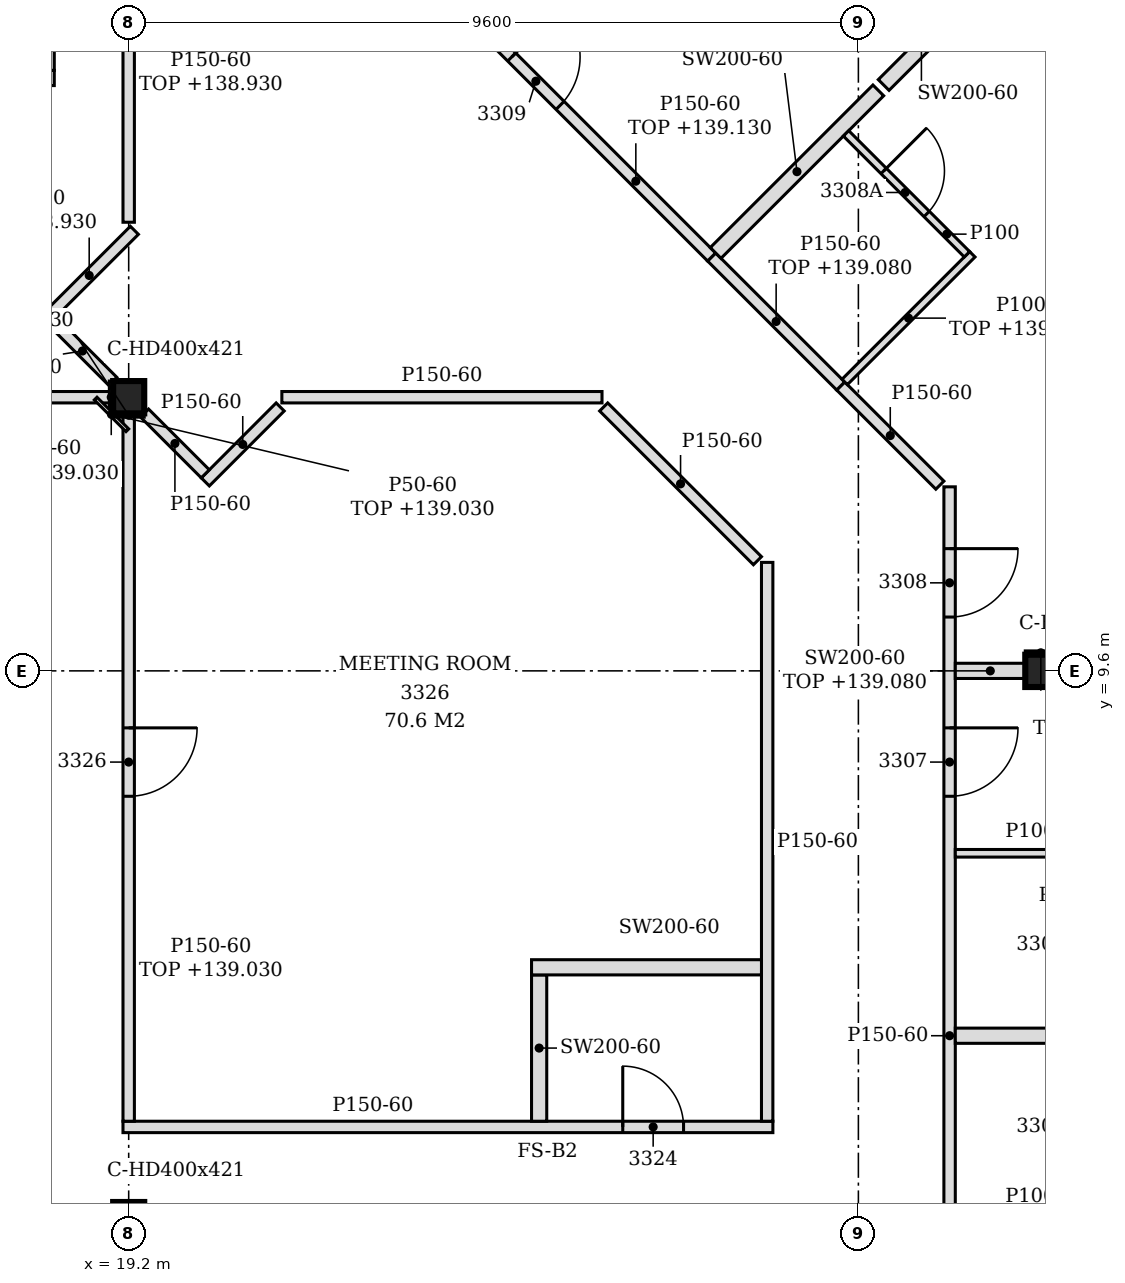
"""IFC4 building model, lengths in metres.
Left out: names, types, materials, properties, quantities, classifications, styles, units other than length and angle.
Written with IfcOpenShell. Run it as: python <this file> out.ifc"""

import sys

from ifc_helpers import new_model, si_unit, direction, frame, frame_2d, origin, origin_2d, place, context, subcontext, project, spatial, polyline, rectangle, i_section, outline, extrude, element, fill, save


model = new_model("IFC4")
c1 = context("Model", 3, precision=1e-05, world=origin(), true_north=direction((0.0, 1.0)))
c2 = subcontext(c1, "Body", "Model", "MODEL_VIEW")
j1 = project(units=[si_unit("LENGTHUNIT", "METRE"), si_unit("PLANEANGLEUNIT", "RADIAN")], contexts=[c1])
p1 = place(None, origin())
s1 = spatial("IfcSite", under=j1, at=p1, CompositionType="ELEMENT")
p2 = place(p1, origin())
s2 = spatial("IfcBuilding", under=s1, at=p2, CompositionType="ELEMENT")
p3 = place(p2, frame((0.0, 0.0, 136.2)))
s3 = spatial("IfcBuildingStorey", under=s2, at=p3, CompositionType="ELEMENT", Elevation=136.2)
for number, where, z_axis, x_axis in (
    (1, (19.2, 2.4, -0.15), (0.0, 0.0, 1.0), (1.0, 0.0, 0.0)),
    (2, (19.2, 13.2, -0.15), (0.0, 0.0, 1.0), (1.0, 0.0, 0.0)),
    (3, (31.2, 9.6, -0.15), (0.0, 0.0, 1.0), (1.0, 0.0, 0.0)),
):
    element("IfcColumn", number, at=place(p3, frame(where, z_axis=z_axis, x_axis=x_axis)), inside=s3, PredefinedType="COLUMN", context=c2, shape_type="SweptSolid", body=[
        extrude(i_section(OverallWidth=0.409, OverallDepth=0.425, WebThickness=0.033, FlangeThickness=0.052, FilletRadius=0.015, at=origin_2d()), origin(), (0.0, 0.0, 1.0), 3.6),
    ])
p4 = place(p3, frame((30.0, -0.813, 0.0), z_axis=(0.0, 0.0, 1.0), x_axis=(0.0, 1.0, 0.0)))
e4 = element("IfcWall", 4, at=p4, inside=s3, PredefinedType="PARTITIONING", context=c2, shape_type="SweptSolid", body=[
    extrude(outline(polyline([(0.0, 0.0), (12.834, 0.0), (12.834, 3.45), (10.518, 3.45), (10.516, 2.88), (10.308, 2.88), (10.306, 3.45), (5.718, 3.45), (5.716, 2.88), (5.508, 2.88), (5.506, 3.45), (0.918, 3.45), (0.916, 2.88), (0.708, 2.88), (0.706, 3.45), (0.0, 3.45), (0.0, 0.0)])), frame((0.0, 0.075, 0.0), z_axis=(0.0, -1.0, 0.0), x_axis=(1.0, 0.0, 0.0)), (0.0, 0.0, 1.0), 0.15),
])
p5 = place(p4, frame((1.563, 0.0, 0.0)))
e5 = element("IfcOpeningElement", 5, at=p5, cuts=e4, PredefinedType="OPENING", context=c2, shape_type="SweptSolid", body=[
    extrude(rectangle(XDim=0.9, YDim=2.1, at=frame_2d((0.45, 1.05))), frame((0.0, 0.085, 0.0), z_axis=(0.0, -1.0, 0.0), x_axis=(1.0, 0.0, 0.0)), (0.0, 0.0, 1.0), 0.17),
])
p6 = place(p4, frame((8.763, 0.0, 0.0)))
e6 = element("IfcOpeningElement", 6, at=p6, cuts=e4, PredefinedType="OPENING", context=c2, shape_type="SweptSolid", body=[
    extrude(rectangle(XDim=0.9, YDim=2.1, at=frame_2d((0.45, 1.05))), frame((0.0, 0.085, 0.0), z_axis=(0.0, -1.0, 0.0), x_axis=(1.0, 0.0, 0.0)), (0.0, 0.0, 1.0), 0.17),
])
p7 = place(p4, frame((11.121, 0.0, 0.0)))
e7 = element("IfcOpeningElement", 7, at=p7, cuts=e4, PredefinedType="OPENING", context=c2, shape_type="SweptSolid", body=[
    extrude(rectangle(XDim=0.9, YDim=2.1, at=frame_2d((0.45, 1.05))), frame((0.0, 0.085, 0.0), z_axis=(0.0, -1.0, 0.0), x_axis=(1.0, 0.0, 0.0)), (0.0, 0.0, 1.0), 0.17),
])
p8 = place(p3, frame((19.125, 3.6, 0.0), z_axis=(0.0, 0.0, 1.0), x_axis=(1.0, 0.0, 0.0)))
e8 = element("IfcWall", 8, at=p8, inside=s3, PredefinedType="PARTITIONING", context=c2, shape_type="SweptSolid", body=[
    extrude(outline(polyline([(0.0, 0.0), (8.55, 0.0), (8.55, 3.45), (0.225, 3.45), (0.223, 2.83), (0.0, 2.83), (0.0, 0.0)])), frame((0.0, 0.075, 0.0), z_axis=(0.0, -1.0, 0.0), x_axis=(1.0, 0.0, 0.0)), (0.0, 0.0, 1.0), 0.15),
])
p9 = place(p8, frame((6.575, 0.0, 0.0)))
e9 = element("IfcOpeningElement", 9, at=p9, cuts=e8, PredefinedType="OPENING", context=c2, shape_type="SweptSolid", body=[
    extrude(rectangle(XDim=0.8, YDim=2.1, at=frame_2d((0.4, 1.05))), frame((0.0, 0.085, 0.0), z_axis=(0.0, -1.0, 0.0), x_axis=(1.0, 0.0, 0.0)), (0.0, 0.0, 1.0), 0.17),
])
p10 = place(p3, frame((19.2, 3.675, 0.0), z_axis=(0.0, 0.0, 1.0), x_axis=(0.0, 1.0, 0.0)))
e10 = element("IfcWall", 10, at=p10, inside=s3, PredefinedType="PARTITIONING", context=c2, shape_type="SweptSolid", body=[
    extrude(rectangle(XDim=9.312, YDim=0.15, at=frame_2d((4.656, 0.0))), origin(), (0.0, 0.0, 1.0), 2.83),
])
p11 = place(p10, frame((4.275, 0.0, 0.0)))
e11 = element("IfcOpeningElement", 11, at=p11, cuts=e10, PredefinedType="OPENING", context=c2, shape_type="SweptSolid", body=[
    extrude(rectangle(XDim=0.9, YDim=2.1, at=frame_2d((0.45, 1.05))), frame((0.0, 0.085, 0.0), z_axis=(0.0, -1.0, 0.0), x_axis=(1.0, 0.0, 0.0)), (0.0, 0.0, 1.0), 0.17),
])
p12 = place(p3, frame((24.6, 3.675, 0.0), z_axis=(0.0, 0.0, 1.0), x_axis=(0.0, 1.0, 0.0)))
e12 = element("IfcWall", 12, at=p12, inside=s3, PredefinedType="PARTITIONING", context=c2, shape_type="SweptSolid", body=[
    extrude(outline(polyline([(0.0, 0.0), (1.925, 0.0), (1.925, 3.45), (1.23, 3.45), (1.228, 2.88), (1.02, 2.88), (1.018, 3.45), (0.0, 3.45), (0.0, 0.0)])), frame((0.0, 0.1, 0.0), z_axis=(0.0, -1.0, 0.0), x_axis=(1.0, 0.0, 0.0)), (0.0, 0.0, 1.0), 0.2),
])
p13 = place(p3, frame((27.6, 3.675, 0.0), z_axis=(0.0, 0.0, 1.0), x_axis=(0.0, 1.0, 0.0)))
e13 = element("IfcWall", 13, at=p13, inside=s3, PredefinedType="PARTITIONING", context=c2, shape_type="SweptSolid", body=[
    extrude(outline(polyline([(0.0, 0.0), (7.352, 0.0), (7.352, 3.45), (6.03, 3.45), (6.028, 2.88), (5.82, 2.88), (5.818, 3.45), (1.23, 3.45), (1.228, 2.88), (1.02, 2.88), (1.018, 3.45), (0.0, 3.45), (0.0, 0.0)])), frame((0.0, 0.075, 0.0), z_axis=(0.0, -1.0, 0.0), x_axis=(1.0, 0.0, 0.0)), (0.0, 0.0, 1.0), 0.15),
])
p14 = place(p3, frame((30.075, 4.8, 0.0), z_axis=(0.0, 0.0, 1.0), x_axis=(1.0, 0.0, 0.0)))
e14 = element("IfcWall", 14, at=p14, inside=s3, PredefinedType="PARTITIONING", context=c2, shape_type="SweptSolid", body=[
    extrude(rectangle(XDim=4.675, YDim=0.2, at=frame_2d((2.337, 0.0))), origin(), (0.0, 0.0, 1.0), 2.88),
])
p15 = place(p3, frame((24.5, 5.7, 0.0), z_axis=(0.0, 0.0, 1.0), x_axis=(1.0, 0.0, 0.0)))
e15 = element("IfcWall", 15, at=p15, inside=s3, PredefinedType="PARTITIONING", context=c2, shape_type="SweptSolid", body=[
    extrude(rectangle(XDim=3.025, YDim=0.2, at=frame_2d((1.512, 0.0))), origin(), (0.0, 0.0, 1.0), 3.45),
])
p16 = place(p3, frame((30.075, 7.2, 0.0), z_axis=(0.0, 0.0, 1.0), x_axis=(1.0, 0.0, 0.0)))
e16 = element("IfcWall", 16, at=p16, inside=s3, PredefinedType="PARTITIONING", context=c2, shape_type="SweptSolid", body=[
    extrude(outline(polyline([(0.0, 0.0), (1.975, 0.0), (1.975, 3.45), (1.275, 3.45), (1.273, 2.93), (0.975, 2.93), (0.973, 3.45), (0.0, 3.45), (0.0, 0.0)])), frame((0.0, 0.05, 0.0), z_axis=(0.0, -1.0, 0.0), x_axis=(1.0, 0.0, 0.0)), (0.0, 0.0, 1.0), 0.1),
])
p17 = place(p3, frame((30.075, 9.6, 0.0), z_axis=(0.0, 0.0, 1.0), x_axis=(1.0, 0.0, 0.0)))
e17 = element("IfcWall", 17, at=p17, inside=s3, PredefinedType="PARTITIONING", context=c2, shape_type="SweptSolid", body=[
    extrude(rectangle(XDim=0.921, YDim=0.2, at=frame_2d((0.46, 0.0))), origin(), (0.0, 0.0, 1.0), 2.88),
])
p18 = place(p3, frame((27.472, 11.049, 0.0), z_axis=(0.0, 0.0, 1.0), x_axis=(-0.707106781187, 0.707106781187, 0.0)))
e18 = element("IfcWall", 18, at=p18, inside=s3, PredefinedType="PARTITIONING", context=c2, shape_type="SweptSolid", body=[
    extrude(rectangle(XDim=2.861, YDim=0.15, at=frame_2d((1.43, 0.0))), origin(), (0.0, 0.0, 1.0), 3.45),
])
p19 = place(p3, frame((29.872, 12.043, 0.0), z_axis=(0.0, 0.0, 1.0), x_axis=(-0.707172918471, 0.707040637716, 0.0)))
e19 = element("IfcWall", 19, at=p19, inside=s3, PredefinedType="PARTITIONING", context=c2, shape_type="SweptSolid", body=[
    extrude(rectangle(XDim=1.846, YDim=0.15, at=frame_2d((0.923, 0.0))), origin(), (0.0, 0.0, 1.0), 3.45),
])
p20 = place(p3, frame((20.208, 12.086, 0.0), z_axis=(0.0, 0.0, 1.0), x_axis=(0.706756381459, 0.707457007363, 0.0)))
e20 = element("IfcWall", 20, at=p20, inside=s3, PredefinedType="PARTITIONING", context=c2, shape_type="SweptSolid", body=[
    extrude(rectangle(XDim=1.394, YDim=0.15, at=frame_2d((0.697, 0.0))), origin(), (0.0, 0.0, 1.0), 3.45),
])
p21 = place(p3, frame((20.208, 12.192, 0.0), z_axis=(0.0, 0.0, 1.0), x_axis=(-0.70721474466, 0.706998801226, 0.0)))
e21 = element("IfcWall", 21, at=p21, inside=s3, PredefinedType="PARTITIONING", context=c2, shape_type="SweptSolid", body=[
    extrude(rectangle(XDim=1.131, YDim=0.15, at=frame_2d((0.565, 0.0))), origin(), (0.0, 0.0, 1.0), 3.45),
])
p22 = place(p3, frame((7.405, 13.2, 0.0), z_axis=(0.0, 0.0, 1.0), x_axis=(1.0, 0.0, 0.0)))
e22 = element("IfcWall", 22, at=p22, inside=s3, PredefinedType="PARTITIONING", context=c2, shape_type="SweptSolid", body=[
    extrude(rectangle(XDim=11.591, YDim=0.15, at=frame_2d((5.795, 0.0))), origin(), (0.0, 0.0, 1.0), 2.83),
])
p23 = place(p22, frame((5.345, 0.0, 0.0)))
e23 = element("IfcOpeningElement", 23, at=p23, cuts=e22, PredefinedType="OPENING", context=c2, shape_type="SweptSolid", body=[
    extrude(rectangle(XDim=0.9, YDim=2.1, at=frame_2d((0.45, 1.05))), frame((0.0, 0.085, 0.0), z_axis=(0.0, -1.0, 0.0), x_axis=(1.0, 0.0, 0.0)), (0.0, 0.0, 1.0), 0.17),
])
p24 = place(p3, frame((21.215, 13.2, 0.0), z_axis=(0.0, 0.0, 1.0), x_axis=(1.0, 0.0, 0.0)))
e24 = element("IfcWall", 24, at=p24, inside=s3, PredefinedType="PARTITIONING", context=c2, shape_type="SweptSolid", body=[
    extrude(rectangle(XDim=4.212, YDim=0.15, at=frame_2d((2.106, 0.0))), origin(), (0.0, 0.0, 1.0), 3.45),
])
p25 = place(p3, frame((28.567, 13.348, 0.0), z_axis=(0.0, 0.0, 1.0), x_axis=(-0.707310148094, 0.706903355773, 0.0)))
e25 = element("IfcWall", 25, at=p25, inside=s3, PredefinedType="PARTITIONING", context=c2, shape_type="SweptSolid", body=[
    extrude(rectangle(XDim=2.401, YDim=0.15, at=frame_2d((1.2, 0.0))), origin(), (0.0, 0.0, 1.0), 2.88),
])
p26 = place(p3, frame((18.991, 13.408, 0.0), z_axis=(0.0, 0.0, 1.0), x_axis=(-0.706998801226, 0.70721474466, 0.0)))
e26 = element("IfcWall", 26, at=p26, inside=s3, PredefinedType="PARTITIONING", context=c2, shape_type="SweptSolid", body=[
    extrude(rectangle(XDim=1.131, YDim=0.15, at=frame_2d((0.565, 0.0))), origin(), (0.0, 0.0, 1.0), 3.45),
])
p27 = place(p3, frame((28.62, 13.401, 0.0), z_axis=(0.0, 0.0, 1.0), x_axis=(0.707055379538, 0.707158179099, 0.0)))
e27 = element("IfcWall", 27, at=p27, inside=s3, PredefinedType="PARTITIONING", context=c2, shape_type="SweptSolid", body=[
    extrude(rectangle(XDim=2.375, YDim=0.1, at=frame_2d((1.188, 0.0))), origin(), (0.0, 0.0, 1.0), 2.88),
])
p28 = place(p3, frame((18.086, 14.208, 0.0), z_axis=(0.0, 0.0, 1.0), x_axis=(0.70739723372, 0.706816209298, 0.0)))
e28 = element("IfcWall", 28, at=p28, inside=s3, PredefinedType="PARTITIONING", context=c2, shape_type="SweptSolid", body=[
    extrude(rectangle(XDim=1.681, YDim=0.15, at=frame_2d((0.84, 0.0))), origin(), (0.0, 0.0, 1.0), 2.73),
])
p29 = place(p3, frame((26.869, 15.045, 0.0), z_axis=(0.0, 0.0, 1.0), x_axis=(-0.707013447311, 0.707200102744, 0.0)))
e29 = element("IfcWall", 29, at=p29, inside=s3, PredefinedType="PARTITIONING", context=c2, shape_type="SweptSolid", body=[
    extrude(rectangle(XDim=6.54, YDim=0.15, at=frame_2d((3.27, 0.0))), origin(), (0.0, 0.0, 1.0), 2.93),
])
p30 = place(p29, frame((2.82, 0.0, 0.0)))
e30 = element("IfcOpeningElement", 30, at=p30, cuts=e29, PredefinedType="OPENING", context=c2, shape_type="SweptSolid", body=[
    extrude(rectangle(XDim=0.9, YDim=2.1, at=frame_2d((0.45, 1.05))), frame((0.0, 0.085, 0.0), z_axis=(0.0, -1.0, 0.0), x_axis=(1.0, 0.0, 0.0)), (0.0, 0.0, 1.0), 0.17),
])
p31 = place(p3, frame((26.922, 15.098, 0.0), z_axis=(0.0, 0.0, 1.0), x_axis=(0.707268147401, 0.706945378138, 0.0)))
e31 = element("IfcWall", 31, at=p31, inside=s3, PredefinedType="PARTITIONING", context=c2, shape_type="SweptSolid", body=[
    extrude(rectangle(XDim=3.026, YDim=0.2, at=frame_2d((1.513, 0.0))), origin(), (0.0, 0.0, 1.0), 3.45),
])
p32 = place(p3, frame((30.229, 15.08, 0.0), z_axis=(0.0, 0.0, 1.0), x_axis=(-0.707052524, 0.70716103421, 0.0)))
e32 = element("IfcWall", 32, at=p32, inside=s3, PredefinedType="PARTITIONING", context=c2, shape_type="SweptSolid", body=[
    extrude(rectangle(XDim=2.25, YDim=0.1, at=frame_2d((1.125, 0.0))), origin(), (0.0, 0.0, 1.0), 3.45),
])
p33 = place(p32, frame((0.75, 0.0, 0.0)))
e33 = element("IfcOpeningElement", 33, at=p33, cuts=e32, PredefinedType="OPENING", context=c2, shape_type="SweptSolid", body=[
    extrude(rectangle(XDim=0.8, YDim=2.1, at=frame_2d((0.4, 1.05))), frame((0.0, 0.06, 0.0), z_axis=(0.0, -1.0, 0.0), x_axis=(1.0, 0.0, 0.0)), (0.0, 0.0, 1.0), 0.12),
])
p34 = place(p3, frame((19.2, 15.502, 0.0), z_axis=(0.0, 0.0, 1.0), x_axis=(0.0, 1.0, 0.0)))
e34 = element("IfcWall", 34, at=p34, inside=s3, PredefinedType="PARTITIONING", context=c2, shape_type="SweptSolid", body=[
    extrude(rectangle(XDim=3.925, YDim=0.15, at=frame_2d((1.962, 0.0))), origin(), (0.0, 0.0, 1.0), 2.73),
])
p35 = place(p3, frame((29.133, 17.308, 0.0), z_axis=(0.0, 0.0, 1.0), x_axis=(0.70693298083, 0.707280538835, 0.0)))
e35 = element("IfcWall", 35, at=p35, inside=s3, PredefinedType="PARTITIONING", context=c2, shape_type="SweptSolid", body=[
    extrude(rectangle(XDim=1.405, YDim=0.2, at=frame_2d((0.702, 0.0))), origin(), (0.0, 0.0, 1.0), 3.45),
])
p36 = place(p3, frame((15.021, 17.4, 0.0), z_axis=(0.0, 0.0, 1.0), x_axis=(1.0, 0.0, 0.0)))
e36 = element("IfcWall", 36, at=p36, inside=s3, PredefinedType="PARTITIONING", context=c2, shape_type="SweptSolid", body=[
    extrude(rectangle(XDim=3.2, YDim=0.2, at=frame_2d((1.6, 0.0))), origin(), (0.0, 0.0, 1.0), 3.45),
])
p37 = place(p3, frame((18.121, 17.5, 0.0), z_axis=(0.0, 0.0, 1.0), x_axis=(0.0, 1.0, 0.0)))
e37 = element("IfcWall", 37, at=p37, inside=s3, PredefinedType="PARTITIONING", context=c2, shape_type="SweptSolid", body=[
    extrude(outline(polyline([(0.0, 0.0), (3.016, 0.0), (3.016, 3.45), (1.805, 3.45), (1.803, 2.88), (1.595, 2.88), (1.593, 3.45), (0.0, 3.45), (0.0, 0.0)])), frame((0.0, 0.1, 0.0), z_axis=(0.0, -1.0, 0.0), x_axis=(1.0, 0.0, 0.0)), (0.0, 0.0, 1.0), 0.2),
])
p38 = place(p3, frame((18.97, 12.988, 0.0), z_axis=(0.0, 0.0, 1.0), x_axis=(0.0, 1.0, 0.0)))
e38 = element("IfcWall", 38, at=p38, inside=s3, PredefinedType="PARTITIONING", context=c2, shape_type="SweptSolid", body=[
    extrude(rectangle(XDim=0.425, YDim=0.05, at=frame_2d((0.212, 0.0))), origin(), (0.0, 0.0, 1.0), 2.83),
])
p39 = place(p3, frame((30.996, 9.837, 0.0), z_axis=(0.0, 0.0, 1.0), x_axis=(1.0, 0.0, 0.0)))
e39 = element("IfcWall", 39, at=p39, inside=s3, PredefinedType="PARTITIONING", context=c2, shape_type="SweptSolid", body=[
    extrude(rectangle(XDim=0.409, YDim=0.05, at=frame_2d((0.205, 0.0))), origin(), (0.0, 0.0, 1.0), 2.93),
])
p40 = place(p3, frame((19.182, 12.765, 0.0), z_axis=(0.0, 0.0, 1.0), x_axis=(-0.707106781187, 0.707106781187, 0.0)))
e40 = element("IfcWall", 40, at=p40, inside=s3, PredefinedType="PARTITIONING", context=c2, shape_type="SweptSolid", body=[
    extrude(rectangle(XDim=0.59, YDim=0.05, at=frame_2d((0.295, 0.0))), origin(), (0.0, 0.0, 1.0), 2.83),
])
p41 = place(p3, frame((18.996, 12.962, 0.0), z_axis=(0.0, 0.0, 1.0), x_axis=(1.0, 0.0, 0.0)))
e41 = element("IfcWall", 41, at=p41, inside=s3, PredefinedType="PARTITIONING", context=c2, shape_type="SweptSolid", body=[
    extrude(rectangle(XDim=0.409, YDim=0.05, at=frame_2d((0.205, 0.0))), origin(), (0.0, 0.0, 1.0), 2.83),
])
p42 = place(p6, frame((0.9, 0.0, 0.0), z_axis=(0.0, 0.0, 1.0), x_axis=(-1.0, 0.0, 0.0)))
e42 = element("IfcDoor", 42, at=p42, inside=s3, OperationType="SINGLE_SWING_LEFT", PredefinedType="DOOR", context=c2, shape_type="SweptSolid", body=[
    extrude(rectangle(XDim=0.9, YDim=2.1, at=frame_2d((0.45, 1.05))), frame((0.0, 0.025, 0.0), z_axis=(0.0, -1.0, 0.0), x_axis=(1.0, 0.0, 0.0)), (0.0, 0.0, 1.0), 0.05),
])
fill(e6, e42)
p43 = place(p7, frame((0.9, 0.0, 0.0), z_axis=(0.0, 0.0, 1.0), x_axis=(-1.0, 0.0, 0.0)))
e43 = element("IfcDoor", 43, at=p43, inside=s3, OperationType="SINGLE_SWING_LEFT", PredefinedType="DOOR", context=c2, shape_type="SweptSolid", body=[
    extrude(rectangle(XDim=0.9, YDim=2.1, at=frame_2d((0.45, 1.05))), frame((0.0, 0.025, 0.0), z_axis=(0.0, -1.0, 0.0), x_axis=(1.0, 0.0, 0.0)), (0.0, 0.0, 1.0), 0.05),
])
fill(e7, e43)
p44 = place(p33, frame((0.8, 0.0, 0.0), z_axis=(0.0, 0.0, 1.0), x_axis=(-1.0, 0.0, 0.0)))
e44 = element("IfcDoor", 44, at=p44, inside=s3, OperationType="SINGLE_SWING_LEFT", PredefinedType="DOOR", context=c2, shape_type="SweptSolid", body=[
    extrude(rectangle(XDim=0.8, YDim=2.1, at=frame_2d((0.4, 1.05))), frame((0.0, 0.025, 0.0), z_axis=(0.0, -1.0, 0.0), x_axis=(1.0, 0.0, 0.0)), (0.0, 0.0, 1.0), 0.05),
])
fill(e33, e44)
p45 = place(p30, frame((0.9, 0.0, 0.0), z_axis=(0.0, 0.0, 1.0), x_axis=(-1.0, 0.0, 0.0)))
e45 = element("IfcDoor", 45, at=p45, inside=s3, OperationType="SINGLE_SWING_LEFT", PredefinedType="DOOR", context=c2, shape_type="SweptSolid", body=[
    extrude(rectangle(XDim=0.9, YDim=2.1, at=frame_2d((0.45, 1.05))), frame((0.0, 0.025, 0.0), z_axis=(0.0, -1.0, 0.0), x_axis=(1.0, 0.0, 0.0)), (0.0, 0.0, 1.0), 0.05),
])
fill(e30, e45)
p46 = place(p9, origin())
e46 = element("IfcDoor", 46, at=p46, inside=s3, OperationType="SINGLE_SWING_LEFT", PredefinedType="DOOR", context=c2, shape_type="SweptSolid", body=[
    extrude(rectangle(XDim=0.8, YDim=2.1, at=frame_2d((0.4, 1.05))), frame((0.0, 0.025, 0.0), z_axis=(0.0, -1.0, 0.0), x_axis=(1.0, 0.0, 0.0)), (0.0, 0.0, 1.0), 0.05),
])
fill(e9, e46)
p47 = place(p11, frame((0.9, 0.0, 0.0), z_axis=(0.0, 0.0, 1.0), x_axis=(-1.0, 0.0, 0.0)))
e47 = element("IfcDoor", 47, at=p47, inside=s3, OperationType="SINGLE_SWING_LEFT", PredefinedType="DOOR", context=c2, shape_type="SweptSolid", body=[
    extrude(rectangle(XDim=0.9, YDim=2.1, at=frame_2d((0.45, 1.05))), frame((0.0, 0.025, 0.0), z_axis=(0.0, -1.0, 0.0), x_axis=(1.0, 0.0, 0.0)), (0.0, 0.0, 1.0), 0.05),
])
fill(e11, e47)
save(model, sys.argv[1])
